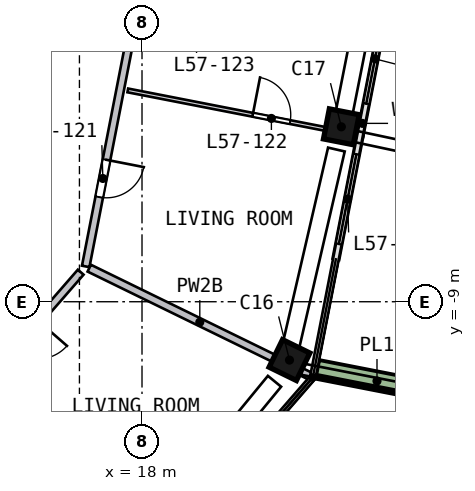
"""IFC4 building model, lengths in metres.
Left out: names, types, materials, properties, quantities, classifications, styles, units other than length and angle.
Written with IfcOpenShell. Run it as: python <this file> out.ifc"""

import sys

from ifc_helpers import new_model, si_unit, direction, frame, frame_2d, origin, origin_2d, place, context, subcontext, project, spatial, rectangle, extrude, element, fill, save


model = new_model("IFC4")
c1 = context("Model", 3, precision=1e-05, world=origin(), true_north=direction((0.0, 1.0)))
c2 = subcontext(c1, "Body", "Model", "MODEL_VIEW")
j1 = project(units=[si_unit("LENGTHUNIT", "METRE"), si_unit("PLANEANGLEUNIT", "RADIAN")], contexts=[c1])
p1 = place(None, origin())
s1 = spatial("IfcSite", under=j1, at=p1, CompositionType="ELEMENT")
p2 = place(p1, origin())
s2 = spatial("IfcBuilding", under=s1, at=p2, CompositionType="ELEMENT")
p3 = place(p2, frame((0.0, 0.0, 234.0)))
s3 = spatial("IfcBuildingStorey", under=s2, at=p3, CompositionType="ELEMENT", Elevation=234.0)
p4 = place(p3, frame((21.821, -10.662, 0.0), z_axis=(0.049870385, 0.104226063, 0.993302508), x_axis=(-0.436319792, -0.892342905, 0.115538643)))
e1 = element("IfcColumn", 1, at=p4, inside=s3, PredefinedType="COLUMN", context=c2, shape_type="SweptSolid", body=[
    extrude(rectangle(XDim=0.8, YDim=0.8, at=origin_2d()), origin(), (0.0, 0.0, 1.0), 3.211),
])
p5 = place(p3, frame((23.22, -4.531, 0.0), z_axis=(0.020609061, 0.110650124, 0.99364572), x_axis=(0.190224415, 0.975267855, -0.112549024)))
e2 = element("IfcColumn", 2, at=p5, inside=s3, PredefinedType="COLUMN", context=c2, shape_type="SweptSolid", body=[
    extrude(rectangle(XDim=0.8, YDim=0.8, at=origin_2d()), origin(), (0.0, 0.0, 1.0), 3.21),
])
p6 = place(p3, frame((23.104, -7.87, 0.0), z_axis=(0.0, 0.0, 1.0), x_axis=(0.191532956, 0.981486183, 0.0)))
e3 = element("IfcWall", 3, at=p6, inside=s3, PredefinedType="SOLIDWALL", context=c2, shape_type="SweptSolid", body=[
    extrude(rectangle(XDim=3.3, YDim=0.15, at=frame_2d((1.65, 0.0))), origin(), (0.0, 0.0, 1.0), 2.525),
])
p7 = place(p6, frame((0.4, 0.0, 0.0)))
e4 = element("IfcOpeningElement", 4, at=p7, cuts=e3, PredefinedType="OPENING", context=c2, shape_type="SweptSolid", body=[
    extrude(rectangle(XDim=2.4, YDim=2.4, at=frame_2d((1.2, 1.2))), frame((0.0, 0.085, 0.0), z_axis=(0.0, -1.0, 0.0), x_axis=(1.0, 0.0, 0.0)), (0.0, 0.0, 1.0), 0.17),
])
p8 = place(p3, frame((23.736, -4.631, 0.0), z_axis=(0.0, 0.0, 1.0), x_axis=(0.191510359, 0.981490592, 0.0)))
e5 = element("IfcWall", 5, at=p8, inside=s3, PredefinedType="SOLIDWALL", context=c2, shape_type="SweptSolid", body=[
    extrude(rectangle(XDim=3.661, YDim=0.15, at=frame_2d((1.831, 0.0))), origin(), (0.0, 0.0, 1.0), 2.525),
])
p9 = place(p8, frame((0.861, 0.0, 0.0)))
e6 = element("IfcOpeningElement", 6, at=p9, cuts=e5, PredefinedType="OPENING", context=c2, shape_type="SweptSolid", body=[
    extrude(rectangle(XDim=2.4, YDim=2.4, at=frame_2d((1.2, 1.2))), frame((0.0, 0.085, 0.0), z_axis=(0.0, -1.0, 0.0), x_axis=(1.0, 0.0, 0.0)), (0.0, 0.0, 1.0), 0.17),
])
p10 = place(p3, frame((22.614, -10.78, 0.0), z_axis=(0.0, 0.0, 1.0), x_axis=(0.981497239, -0.191476291, 0.0)))
e7 = element("IfcWall", 7, at=p10, inside=s3, PredefinedType="SOLIDWALL", context=c2, shape_type="SweptSolid", body=[
    extrude(rectangle(XDim=3.199, YDim=0.5, at=frame_2d((1.6, 0.0))), origin(), (0.0, 0.0, 1.0), 0.7),
])
p11 = place(p3, frame((16.387, -8.222, 0.0), z_axis=(0.0, 0.0, 1.0), x_axis=(-0.656585706, -0.754251424, 0.0)))
e8 = element("IfcWall", 8, at=p11, inside=s3, PredefinedType="SOLIDWALL", context=c2, shape_type="SweptSolid", body=[
    extrude(rectangle(XDim=9.117, YDim=0.2, at=frame_2d((4.558, 0.0))), origin(), (0.0, 0.0, 1.0), 3.19),
])
p12 = place(p11, frame((1.7, 0.0, 0.0)))
e9 = element("IfcOpeningElement", 9, at=p12, cuts=e8, PredefinedType="OPENING", context=c2, shape_type="SweptSolid", body=[
    extrude(rectangle(XDim=1.0, YDim=2.1, at=frame_2d((0.5, 1.05))), frame((0.0, 0.11, 0.0), z_axis=(0.0, -1.0, 0.0), x_axis=(1.0, 0.0, 0.0)), (0.0, 0.0, 1.0), 0.22),
])
p13 = place(p3, frame((18.302, 1.073, 0.0), z_axis=(0.0, 0.0, 1.0), x_axis=(-0.191477727, -0.981496959, 0.0)))
e10 = element("IfcWall", 10, at=p13, inside=s3, PredefinedType="SOLIDWALL", context=c2, shape_type="SweptSolid", body=[
    extrude(rectangle(XDim=9.317, YDim=0.2, at=frame_2d((4.658, 0.0))), origin(), (0.0, 0.0, 1.0), 3.19),
])
p14 = place(p13, frame((6.458, 0.0, 0.0)))
e11 = element("IfcOpeningElement", 11, at=p14, cuts=e10, PredefinedType="OPENING", context=c2, shape_type="SweptSolid", body=[
    extrude(rectangle(XDim=1.0, YDim=2.1, at=frame_2d((0.5, 1.05))), frame((0.0, 0.11, 0.0), z_axis=(0.0, -1.0, 0.0), x_axis=(1.0, 0.0, 0.0)), (0.0, 0.0, 1.0), 0.22),
])
p15 = place(p3, frame((16.612, -8.116, 0.0), z_axis=(0.0, 0.0, 1.0), x_axis=(0.898476571, -0.43902147, 0.0)))
e12 = element("IfcWall", 12, at=p15, inside=s3, PredefinedType="SOLIDWALL", context=c2, shape_type="SweptSolid", body=[
    extrude(rectangle(XDim=6.476, YDim=0.2, at=frame_2d((3.238, 0.0))), origin(), (0.0, 0.0, 1.0), 2.69),
])
p16 = place(p3, frame((18.184, -15.829, 0.0), z_axis=(0.0, 0.0, 1.0), x_axis=(-0.754249014, 0.656588475, 0.0)))
e13 = element("IfcWall", 13, at=p16, inside=s3, PredefinedType="PARTITIONING", context=c2, shape_type="SweptSolid", body=[
    extrude(rectangle(XDim=6.15, YDim=0.1, at=frame_2d((3.075, 0.0))), origin(), (0.0, 0.0, 1.0), 3.19),
])
p17 = place(p16, frame((1.8, 0.0, 0.0)))
e14 = element("IfcOpeningElement", 14, at=p17, cuts=e13, PredefinedType="OPENING", context=c2, shape_type="SweptSolid", body=[
    extrude(rectangle(XDim=1.0, YDim=2.1, at=frame_2d((0.5, 1.05))), frame((0.0, 0.06, 0.0), z_axis=(0.0, -1.0, 0.0), x_axis=(1.0, 0.0, 0.0)), (0.0, 0.0, 1.0), 0.12),
])
p18 = place(p3, frame((17.626, -3.439, 0.0), z_axis=(0.0, 0.0, 1.0), x_axis=(0.981492048, -0.191502898, 0.0)))
e15 = element("IfcWall", 15, at=p18, inside=s3, PredefinedType="PARTITIONING", context=c2, shape_type="SweptSolid", body=[
    extrude(rectangle(XDim=6.15, YDim=0.1, at=frame_2d((3.075, 0.0))), origin(), (0.0, 0.0, 1.0), 3.19),
])
p19 = place(p18, frame((3.35, 0.0, 0.0)))
e16 = element("IfcOpeningElement", 16, at=p19, cuts=e15, PredefinedType="OPENING", context=c2, shape_type="SweptSolid", body=[
    extrude(rectangle(XDim=1.0, YDim=2.1, at=frame_2d((0.5, 1.05))), frame((0.0, 0.06, 0.0), z_axis=(0.0, -1.0, 0.0), x_axis=(1.0, 0.0, 0.0)), (0.0, 0.0, 1.0), 0.12),
])
p20 = place(p7, origin())
e17 = element("IfcDoor", 17, at=p20, inside=s3, OperationType="SLIDING_TO_RIGHT", PredefinedType="DOOR", context=c2, shape_type="SweptSolid", body=[
    extrude(rectangle(XDim=2.4, YDim=2.4, at=frame_2d((1.2, 1.2))), frame((0.0, 0.025, 0.0), z_axis=(0.0, -1.0, 0.0), x_axis=(1.0, 0.0, 0.0)), (0.0, 0.0, 1.0), 0.05),
])
fill(e4, e17)
p21 = place(p9, origin())
e18 = element("IfcDoor", 18, at=p21, inside=s3, OperationType="SLIDING_TO_LEFT", PredefinedType="DOOR", context=c2, shape_type="SweptSolid", body=[
    extrude(rectangle(XDim=2.4, YDim=2.4, at=frame_2d((1.2, 1.2))), frame((0.0, 0.025, 0.0), z_axis=(0.0, -1.0, 0.0), x_axis=(1.0, 0.0, 0.0)), (0.0, 0.0, 1.0), 0.05),
])
fill(e6, e18)
p22 = place(p14, origin())
e19 = element("IfcDoor", 19, at=p22, inside=s3, OperationType="SINGLE_SWING_LEFT", PredefinedType="DOOR", context=c2, shape_type="SweptSolid", body=[
    extrude(rectangle(XDim=1.0, YDim=2.1, at=frame_2d((0.5, 1.05))), frame((0.0, 0.025, 0.0), z_axis=(0.0, -1.0, 0.0), x_axis=(1.0, 0.0, 0.0)), (0.0, 0.0, 1.0), 0.05),
])
fill(e11, e19)
p23 = place(p19, origin())
e20 = element("IfcDoor", 20, at=p23, inside=s3, OperationType="SINGLE_SWING_LEFT", PredefinedType="DOOR", context=c2, shape_type="SweptSolid", body=[
    extrude(rectangle(XDim=1.0, YDim=2.1, at=frame_2d((0.5, 1.05))), frame((0.0, 0.025, 0.0), z_axis=(0.0, -1.0, 0.0), x_axis=(1.0, 0.0, 0.0)), (0.0, 0.0, 1.0), 0.05),
])
fill(e16, e20)
save(model, sys.argv[1])
